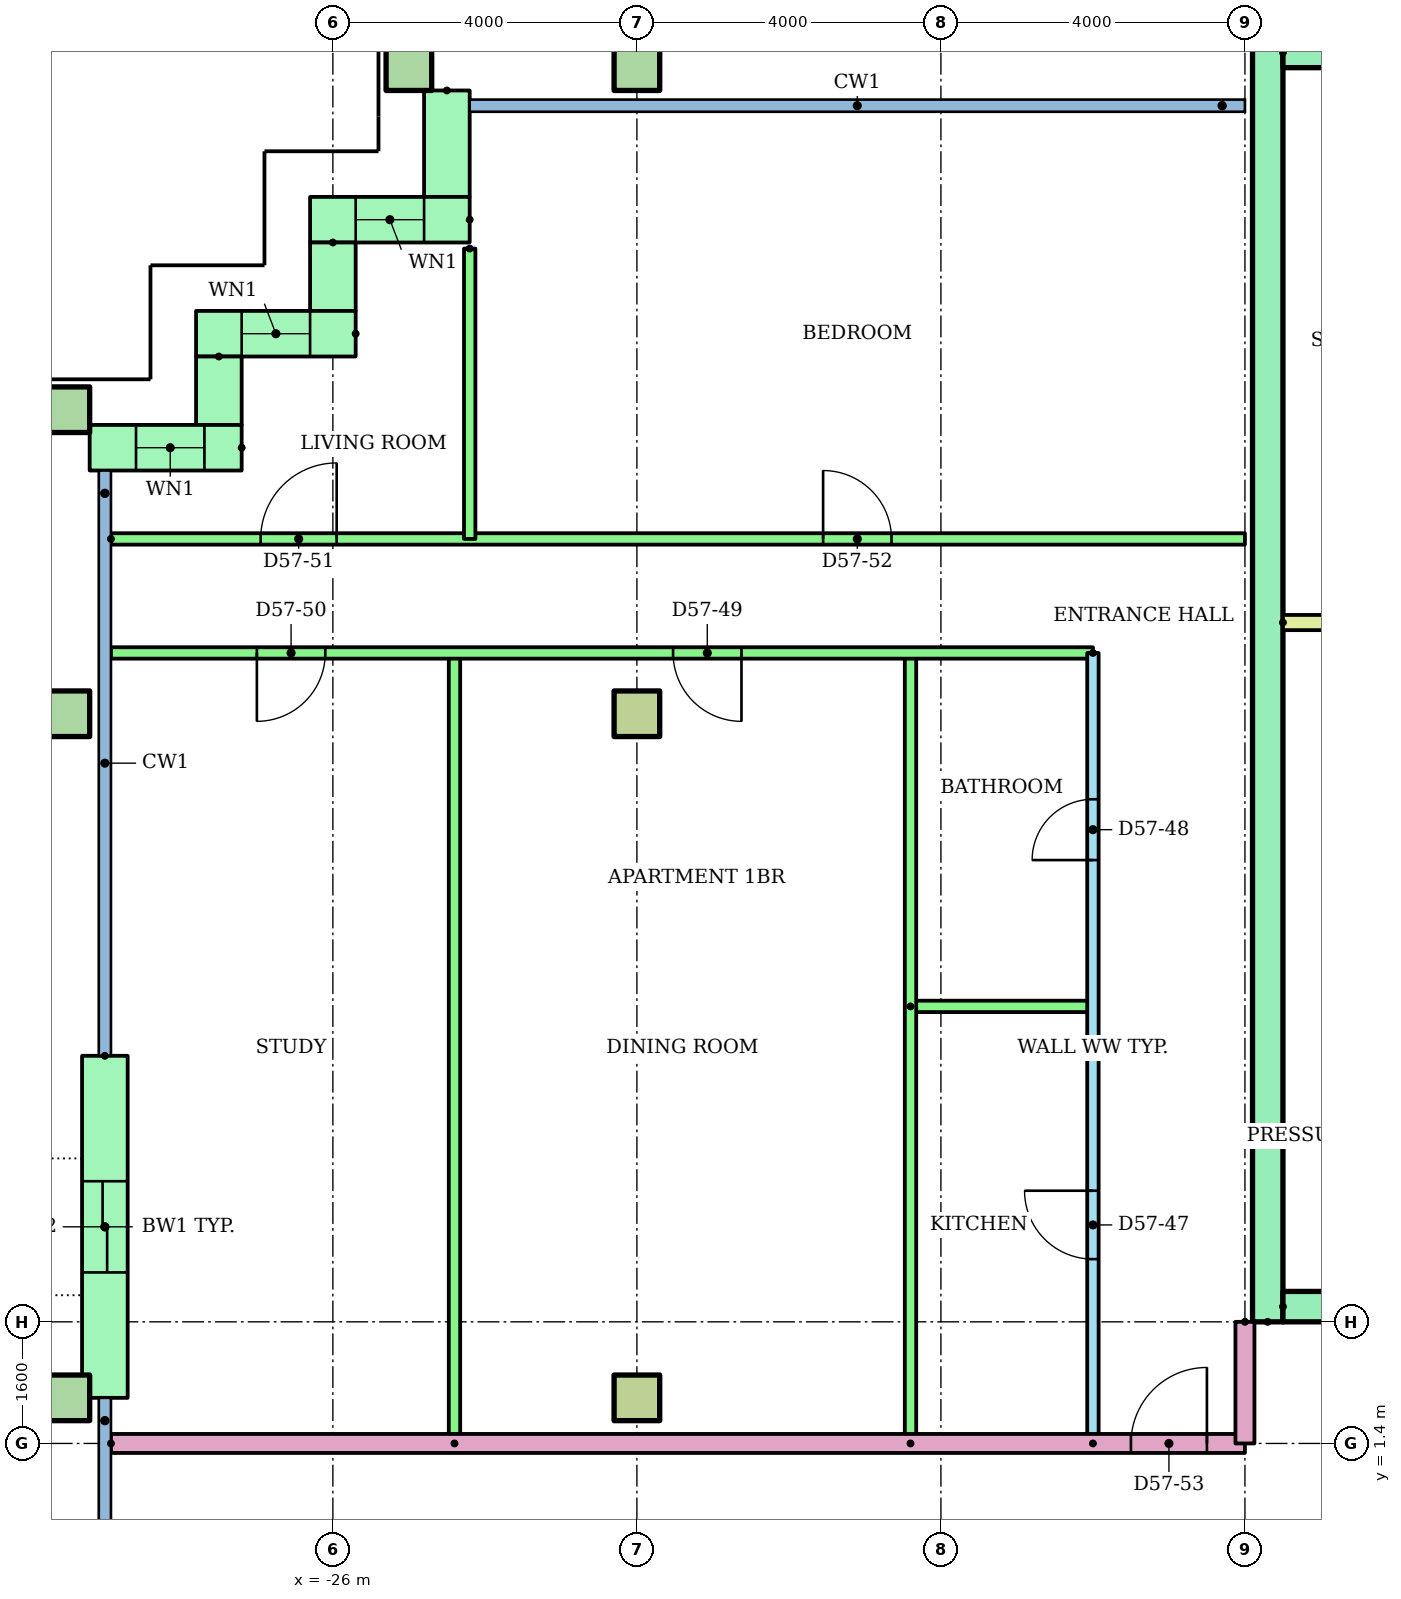
"""IFC4 building model, lengths in metres.
Left out: names, types, materials, properties, quantities, classifications, styles, units other than length and angle.
Written with IfcOpenShell. Run it as: python <this file> out.ifc"""

import sys

from ifc_helpers import new_model, si_unit, direction, frame, frame_2d, origin, origin_2d, place, context, subcontext, project, spatial, rectangle, hollow_rectangle, extrude, element, fill, save


model = new_model("IFC4")
c1 = context("Model", 3, precision=1e-05, world=origin(), true_north=direction((0.0, 1.0)))
c2 = subcontext(c1, "Body", "Model", "MODEL_VIEW")
j1 = project(units=[si_unit("LENGTHUNIT", "METRE"), si_unit("PLANEANGLEUNIT", "RADIAN")], contexts=[c1])
p1 = place(None, origin())
s1 = spatial("IfcSite", under=j1, at=p1, CompositionType="ELEMENT")
p2 = place(p1, origin())
s2 = spatial("IfcBuilding", under=s1, at=p2, CompositionType="ELEMENT")
p3 = place(p2, frame((0.0, 0.0, 220.4)))
s3 = spatial("IfcBuildingStorey", under=s2, at=p3, CompositionType="ELEMENT", Elevation=220.4)
p4 = place(p3, frame((-29.5, 2.0, 0.0)))
e1 = element("IfcColumn", 1, at=p4, inside=s3, PredefinedType="COLUMN", context=c2, shape_type="SweptSolid", body=[
    extrude(hollow_rectangle(XDim=0.6, YDim=0.6, WallThickness=0.03, at=origin_2d()), origin(), (0.0, 0.0, 1.0), 3.2),
])
p5 = place(p3, frame((-22.0, 2.0, 0.0)))
e2 = element("IfcColumn", 2, at=p5, inside=s3, PredefinedType="COLUMN", context=c2, shape_type="SweptSolid", body=[
    extrude(rectangle(XDim=0.6, YDim=0.6, at=origin_2d()), origin(), (0.0, 0.0, 1.0), 3.2),
])
p6 = place(p3, frame((-29.5, 11.0, 0.0)))
e3 = element("IfcColumn", 3, at=p6, inside=s3, PredefinedType="COLUMN", context=c2, shape_type="SweptSolid", body=[
    extrude(hollow_rectangle(XDim=0.6, YDim=0.6, WallThickness=0.03, at=origin_2d()), origin(), (0.0, 0.0, 1.0), 3.2),
])
p7 = place(p3, frame((-22.0, 11.0, 0.0)))
e4 = element("IfcColumn", 4, at=p7, inside=s3, PredefinedType="COLUMN", context=c2, shape_type="SweptSolid", body=[
    extrude(rectangle(XDim=0.6, YDim=0.6, at=origin_2d()), origin(), (0.0, 0.0, 1.0), 3.2),
])
for number, where in (
    (5, (-29.5, 15.0, 0.0)),
    (6, (-25.0, 19.5, 0.0)),
    (7, (-22.0, 19.5, 0.0)),
):
    element("IfcColumn", number, at=place(p3, frame(where)), inside=s3, PredefinedType="COLUMN", context=c2, shape_type="SweptSolid", body=[
        extrude(hollow_rectangle(XDim=0.6, YDim=0.6, WallThickness=0.03, at=origin_2d()), origin(), (0.0, 0.0, 1.0), 3.2),
    ])
p8 = place(p3, frame((-24.5, 19.2, 0.0), z_axis=(0.0, 0.0, 1.0), x_axis=(0.0, -1.0, 0.0)))
e8 = element("IfcWall", 8, at=p8, inside=s3, PredefinedType="STANDARD", context=c2, shape_type="SweptSolid", body=[
    extrude(rectangle(XDim=1.4, YDim=0.6, at=frame_2d((0.7, 0.0))), origin(), (0.0, 0.0, 1.0), 2.92),
])
p9 = place(p3, frame((-24.2, 17.5, 0.0), z_axis=(0.0, 0.0, 1.0), x_axis=(-1.0, 0.0, 0.0)))
e9 = element("IfcWall", 9, at=p9, inside=s3, PredefinedType="STANDARD", context=c2, shape_type="SweptSolid", body=[
    extrude(rectangle(XDim=2.1, YDim=0.6, at=frame_2d((1.05, 0.0))), origin(), (0.0, 0.0, 1.0), 2.92),
])
p10 = place(p9, frame((0.6, 0.0, 0.9)))
e10 = element("IfcOpeningElement", 10, at=p10, cuts=e9, PredefinedType="OPENING", context=c2, shape_type="SweptSolid", body=[
    extrude(rectangle(XDim=0.9, YDim=1.5, at=frame_2d((0.45, 0.75))), frame((0.0, 0.31, 0.0), z_axis=(0.0, -1.0, 0.0), x_axis=(1.0, 0.0, 0.0)), (0.0, 0.0, 1.0), 0.62),
])
p11 = place(p3, frame((-26.0, 17.2, 0.0), z_axis=(0.0, 0.0, 1.0), x_axis=(0.0, -1.0, 0.0)))
e11 = element("IfcWall", 11, at=p11, inside=s3, PredefinedType="STANDARD", context=c2, shape_type="SweptSolid", body=[
    extrude(rectangle(XDim=0.9, YDim=0.6, at=frame_2d((0.45, 0.0))), origin(), (0.0, 0.0, 1.0), 2.92),
])
p12 = place(p3, frame((-25.7, 16.0, 0.0), z_axis=(0.0, 0.0, 1.0), x_axis=(-1.0, 0.0, 0.0)))
e12 = element("IfcWall", 12, at=p12, inside=s3, PredefinedType="STANDARD", context=c2, shape_type="SweptSolid", body=[
    extrude(rectangle(XDim=2.1, YDim=0.6, at=frame_2d((1.05, 0.0))), origin(), (0.0, 0.0, 1.0), 2.92),
])
p13 = place(p12, frame((0.6, 0.0, 0.9)))
e13 = element("IfcOpeningElement", 13, at=p13, cuts=e12, PredefinedType="OPENING", context=c2, shape_type="SweptSolid", body=[
    extrude(rectangle(XDim=0.9, YDim=1.5, at=frame_2d((0.45, 0.75))), frame((0.0, 0.31, 0.0), z_axis=(0.0, -1.0, 0.0), x_axis=(1.0, 0.0, 0.0)), (0.0, 0.0, 1.0), 0.62),
])
p14 = place(p3, frame((-27.5, 15.7, 0.0), z_axis=(0.0, 0.0, 1.0), x_axis=(0.0, -1.0, 0.0)))
e14 = element("IfcWall", 14, at=p14, inside=s3, PredefinedType="STANDARD", context=c2, shape_type="SweptSolid", body=[
    extrude(rectangle(XDim=0.9, YDim=0.6, at=frame_2d((0.45, 0.0))), origin(), (0.0, 0.0, 1.0), 2.92),
])
p15 = place(p3, frame((-27.2, 14.5, 0.0), z_axis=(0.0, 0.0, 1.0), x_axis=(-1.0, 0.0, 0.0)))
e15 = element("IfcWall", 15, at=p15, inside=s3, PredefinedType="STANDARD", context=c2, shape_type="SweptSolid", body=[
    extrude(rectangle(XDim=2.0, YDim=0.6, at=frame_2d((1.0, 0.0))), origin(), (0.0, 0.0, 1.0), 2.92),
])
p16 = place(p15, frame((0.49, 0.0, 0.9)))
e16 = element("IfcOpeningElement", 16, at=p16, cuts=e15, PredefinedType="OPENING", context=c2, shape_type="SweptSolid", body=[
    extrude(rectangle(XDim=0.9, YDim=1.5, at=frame_2d((0.45, 0.75))), frame((0.0, 0.31, 0.0), z_axis=(0.0, -1.0, 0.0), x_axis=(1.0, 0.0, 0.0)), (0.0, 0.0, 1.0), 0.62),
])
p17 = place(p3, frame((-29.0, 6.5, 0.0), z_axis=(0.0, 0.0, 1.0), x_axis=(0.0, -1.0, 0.0)))
e17 = element("IfcWall", 17, at=p17, inside=s3, PredefinedType="STANDARD", context=c2, shape_type="SweptSolid", body=[
    extrude(rectangle(XDim=4.5, YDim=0.6, at=frame_2d((2.25, 0.0))), origin(), (0.0, 0.0, 1.0), 2.92),
])
p18 = place(p17, frame((1.65, 0.0, 0.0)))
e18 = element("IfcOpeningElement", 18, at=p18, cuts=e17, PredefinedType="OPENING", context=c2, shape_type="SweptSolid", body=[
    extrude(rectangle(XDim=1.2, YDim=2.1, at=frame_2d((0.6, 1.05))), frame((0.0, 0.31, 0.0), z_axis=(0.0, -1.0, 0.0), x_axis=(1.0, 0.0, 0.0)), (0.0, 0.0, 1.0), 0.62),
])
p19 = place(p3, frame((-13.7, 3.0, 0.0), z_axis=(0.0, 0.0, 1.0), x_axis=(0.0, 1.0, 0.0)))
e19 = element("IfcWall", 19, at=p19, inside=s3, PredefinedType="SHEAR", context=c2, shape_type="SweptSolid", body=[
    extrude(rectangle(XDim=17.0, YDim=0.4, at=frame_2d((8.5, 0.0))), origin(), (0.0, 0.0, 1.0), 2.92),
])
p20 = place(p3, frame((-13.5, 19.7, 0.0)))
e20 = element("IfcWall", 20, at=p20, inside=s3, PredefinedType="SHEAR", context=c2, shape_type="SweptSolid", body=[
    extrude(rectangle(XDim=27.0, YDim=0.4, at=frame_2d((13.5, 0.0))), origin(), (0.0, 0.0, 1.0), 2.92),
])
p21 = place(p3, frame((-13.5, 3.2, 0.0)))
e21 = element("IfcWall", 21, at=p21, inside=s3, PredefinedType="SHEAR", context=c2, shape_type="SweptSolid", body=[
    extrude(rectangle(XDim=27.0, YDim=0.4, at=frame_2d((13.5, 0.0))), origin(), (0.0, 0.0, 1.0), 2.92),
])
p22 = place(p21, frame((22.083, 0.0, 0.0)))
e22 = element("IfcOpeningElement", 22, at=p22, cuts=e21, PredefinedType="OPENING", context=c2, shape_type="SweptSolid", body=[
    extrude(rectangle(XDim=1.1, YDim=2.1, at=frame_2d((0.55, 1.05))), frame((0.0, 0.21, 0.0), z_axis=(0.0, -1.0, 0.0), x_axis=(1.0, 0.0, 0.0)), (0.0, 0.0, 1.0), 0.42),
])
p23 = place(p21, frame((25.128, 0.0, 0.0)))
e23 = element("IfcOpeningElement", 23, at=p23, cuts=e21, PredefinedType="OPENING", context=c2, shape_type="SweptSolid", body=[
    extrude(rectangle(XDim=1.1, YDim=2.1, at=frame_2d((0.55, 1.05))), frame((0.0, 0.21, 0.0), z_axis=(0.0, -1.0, 0.0), x_axis=(1.0, 0.0, 0.0)), (0.0, 0.0, 1.0), 0.42),
])
p24 = place(p21, frame((12.6, 0.0, 0.0)))
e24 = element("IfcOpeningElement", 24, at=p24, cuts=e21, PredefinedType="OPENING", context=c2, shape_type="SweptSolid", body=[
    extrude(rectangle(XDim=1.8, YDim=2.1, at=frame_2d((0.9, 1.05))), frame((0.0, 0.21, 0.0), z_axis=(0.0, -1.0, 0.0), x_axis=(1.0, 0.0, 0.0)), (0.0, 0.0, 1.0), 0.42),
])
p25 = place(p3, frame((-13.5, 12.2, 0.0)))
e25 = element("IfcWall", 25, at=p25, inside=s3, PredefinedType="PARTITIONING", context=c2, shape_type="SweptSolid", body=[
    extrude(rectangle(XDim=3.9, YDim=0.2, at=frame_2d((1.95, 0.0))), origin(), (0.0, 0.0, 1.0), 2.92),
])
p26 = place(p3, frame((-16.0, 1.4, 0.0), z_axis=(0.0, 0.0, 1.0), x_axis=(0.0, 1.0, 0.0)))
e26 = element("IfcWall", 26, at=p26, inside=s3, PredefinedType="PARTITIONING", context=c2, shape_type="SweptSolid", body=[
    extrude(rectangle(XDim=10.4, YDim=0.15, at=frame_2d((5.2, 0.0))), origin(), (0.0, 0.0, 1.0), 2.4),
])
p27 = place(p26, frame((2.425, 0.0, 0.0)))
e27 = element("IfcOpeningElement", 27, at=p27, cuts=e26, PredefinedType="OPENING", context=c2, shape_type="SweptSolid", body=[
    extrude(rectangle(XDim=0.9, YDim=2.1, at=frame_2d((0.45, 1.05))), frame((0.0, 0.085, 0.0), z_axis=(0.0, -1.0, 0.0), x_axis=(1.0, 0.0, 0.0)), (0.0, 0.0, 1.0), 0.17),
])
p28 = place(p26, frame((7.675, 0.0, 0.0)))
e28 = element("IfcOpeningElement", 28, at=p28, cuts=e26, PredefinedType="OPENING", context=c2, shape_type="SweptSolid", body=[
    extrude(rectangle(XDim=0.8, YDim=2.1, at=frame_2d((0.4, 1.05))), frame((0.0, 0.085, 0.0), z_axis=(0.0, -1.0, 0.0), x_axis=(1.0, 0.0, 0.0)), (0.0, 0.0, 1.0), 0.17),
])
p29 = place(p3, frame((-18.4, 7.15, 0.0)))
e29 = element("IfcWall", 29, at=p29, inside=s3, PredefinedType="PARTITIONING", context=c2, shape_type="SweptSolid", body=[
    extrude(rectangle(XDim=2.4, YDim=0.15, at=frame_2d((1.2, 0.0))), origin(), (0.0, 0.0, 1.0), 2.4),
])
for number, where, z_axis, x_axis in (
    (30, (-18.4, 1.4, 0.0), (0.0, 0.0, 1.0), (0.0, 1.0, 0.0)),
    (31, (-24.4, 1.4, 0.0), (0.0, 0.0, 1.0), (0.0, 1.0, 0.0)),
):
    element("IfcWall", number, at=place(p3, frame(where, z_axis=z_axis, x_axis=x_axis)), inside=s3, PredefinedType="PARTITIONING", context=c2, shape_type="SweptSolid", body=[
        extrude(rectangle(XDim=10.4, YDim=0.15, at=frame_2d((5.2, 0.0))), origin(), (0.0, 0.0, 1.0), 2.4),
    ])
p30 = place(p3, frame((-16.0, 11.8, 0.0), z_axis=(0.0, 0.0, 1.0), x_axis=(-1.0, 0.0, 0.0)))
e32 = element("IfcWall", 32, at=p30, inside=s3, PredefinedType="PARTITIONING", context=c2, shape_type="SweptSolid", body=[
    extrude(rectangle(XDim=12.92, YDim=0.15, at=frame_2d((6.46, 0.0))), origin(), (0.0, 0.0, 1.0), 2.4),
])
p31 = place(p30, frame((4.624, 0.0, 0.0)))
e33 = element("IfcOpeningElement", 33, at=p31, cuts=e32, PredefinedType="OPENING", context=c2, shape_type="SweptSolid", body=[
    extrude(rectangle(XDim=0.9, YDim=2.1, at=frame_2d((0.45, 1.05))), frame((0.0, 0.085, 0.0), z_axis=(0.0, -1.0, 0.0), x_axis=(1.0, 0.0, 0.0)), (0.0, 0.0, 1.0), 0.17),
])
p32 = place(p30, frame((10.1, 0.0, 0.0)))
e34 = element("IfcOpeningElement", 34, at=p32, cuts=e32, PredefinedType="OPENING", context=c2, shape_type="SweptSolid", body=[
    extrude(rectangle(XDim=0.9, YDim=2.1, at=frame_2d((0.45, 1.05))), frame((0.0, 0.085, 0.0), z_axis=(0.0, -1.0, 0.0), x_axis=(1.0, 0.0, 0.0)), (0.0, 0.0, 1.0), 0.17),
])
p33 = place(p3, frame((-28.92, 13.3, 0.0)))
e35 = element("IfcWall", 35, at=p33, inside=s3, PredefinedType="PARTITIONING", context=c2, shape_type="SweptSolid", body=[
    extrude(rectangle(XDim=14.92, YDim=0.15, at=frame_2d((7.46, 0.0))), origin(), (0.0, 0.0, 1.0), 2.4),
])
p34 = place(p33, frame((1.97, 0.0, 0.0)))
e36 = element("IfcOpeningElement", 36, at=p34, cuts=e35, PredefinedType="OPENING", context=c2, shape_type="SweptSolid", body=[
    extrude(rectangle(XDim=1.0, YDim=2.1, at=frame_2d((0.5, 1.05))), frame((0.0, 0.085, 0.0), z_axis=(0.0, -1.0, 0.0), x_axis=(1.0, 0.0, 0.0)), (0.0, 0.0, 1.0), 0.17),
])
p35 = place(p33, frame((9.37, 0.0, 0.0)))
e37 = element("IfcOpeningElement", 37, at=p35, cuts=e35, PredefinedType="OPENING", context=c2, shape_type="SweptSolid", body=[
    extrude(rectangle(XDim=0.9, YDim=2.1, at=frame_2d((0.45, 1.05))), frame((0.0, 0.085, 0.0), z_axis=(0.0, -1.0, 0.0), x_axis=(1.0, 0.0, 0.0)), (0.0, 0.0, 1.0), 0.17),
])
p36 = place(p3, frame((-24.2, 17.12, 0.0), z_axis=(0.0, 0.0, 1.0), x_axis=(0.0, -1.0, 0.0)))
e38 = element("IfcWall", 38, at=p36, inside=s3, PredefinedType="PARTITIONING", context=c2, shape_type="SweptSolid", body=[
    extrude(rectangle(XDim=3.82, YDim=0.15, at=frame_2d((1.91, 0.0))), origin(), (0.0, 0.0, 1.0), 2.4),
])
p37 = place(p3, frame((-28.92, 1.4, 0.0)))
e39 = element("IfcWall", 39, at=p37, inside=s3, PredefinedType="PARTITIONING", context=c2, shape_type="SweptSolid", body=[
    extrude(rectangle(XDim=14.92, YDim=0.25, at=frame_2d((7.46, 0.0))), origin(), (0.0, 0.0, 1.0), 2.4),
])
p38 = place(p37, frame((13.42, 0.0, 0.0)))
e40 = element("IfcOpeningElement", 40, at=p38, cuts=e39, PredefinedType="OPENING", context=c2, shape_type="SweptSolid", body=[
    extrude(rectangle(XDim=1.0, YDim=2.1, at=frame_2d((0.5, 1.05))), frame((0.0, 0.135, 0.0), z_axis=(0.0, -1.0, 0.0), x_axis=(1.0, 0.0, 0.0)), (0.0, 0.0, 1.0), 0.27),
])
p39 = place(p3, frame((-14.0, 3.0, 0.0), z_axis=(0.0, 0.0, 1.0), x_axis=(0.0, -1.0, 0.0)))
e41 = element("IfcWall", 41, at=p39, inside=s3, PredefinedType="PARTITIONING", context=c2, shape_type="SweptSolid", body=[
    extrude(rectangle(XDim=1.6, YDim=0.25, at=frame_2d((0.8, 0.0))), origin(), (0.0, 0.0, 1.0), 2.4),
])
p40 = place(p10, origin())
e42 = element("IfcWindow", 42, at=p40, inside=s3, PartitioningType="SINGLE_PANEL", PredefinedType="WINDOW", context=c2, shape_type="SweptSolid", body=[
    extrude(rectangle(XDim=0.9, YDim=1.5, at=frame_2d((0.45, 0.75))), frame((0.0, 0.03, 0.0), z_axis=(0.0, -1.0, 0.0), x_axis=(1.0, 0.0, 0.0)), (0.0, 0.0, 1.0), 0.06),
])
fill(e10, e42)
p41 = place(p13, origin())
e43 = element("IfcWindow", 43, at=p41, inside=s3, PartitioningType="SINGLE_PANEL", PredefinedType="WINDOW", context=c2, shape_type="SweptSolid", body=[
    extrude(rectangle(XDim=0.9, YDim=1.5, at=frame_2d((0.45, 0.75))), frame((0.0, 0.03, 0.0), z_axis=(0.0, -1.0, 0.0), x_axis=(1.0, 0.0, 0.0)), (0.0, 0.0, 1.0), 0.06),
])
fill(e13, e43)
p42 = place(p16, origin())
e44 = element("IfcWindow", 44, at=p42, inside=s3, PartitioningType="SINGLE_PANEL", PredefinedType="WINDOW", context=c2, shape_type="SweptSolid", body=[
    extrude(rectangle(XDim=0.9, YDim=1.5, at=frame_2d((0.45, 0.75))), frame((0.0, 0.03, 0.0), z_axis=(0.0, -1.0, 0.0), x_axis=(1.0, 0.0, 0.0)), (0.0, 0.0, 1.0), 0.06),
])
fill(e16, e44)
p43 = place(p27, origin())
e45 = element("IfcDoor", 45, at=p43, inside=s3, OperationType="SINGLE_SWING_RIGHT", PredefinedType="DOOR", context=c2, shape_type="SweptSolid", body=[
    extrude(rectangle(XDim=0.9, YDim=2.1, at=frame_2d((0.45, 1.05))), frame((0.0, 0.025, 0.0), z_axis=(0.0, -1.0, 0.0), x_axis=(1.0, 0.0, 0.0)), (0.0, 0.0, 1.0), 0.05),
])
fill(e27, e45)
p44 = place(p28, origin())
e46 = element("IfcDoor", 46, at=p44, inside=s3, OperationType="SINGLE_SWING_LEFT", PredefinedType="DOOR", context=c2, shape_type="SweptSolid", body=[
    extrude(rectangle(XDim=0.8, YDim=2.1, at=frame_2d((0.4, 1.05))), frame((0.0, 0.025, 0.0), z_axis=(0.0, -1.0, 0.0), x_axis=(1.0, 0.0, 0.0)), (0.0, 0.0, 1.0), 0.05),
])
fill(e28, e46)
p45 = place(p31, origin())
e47 = element("IfcDoor", 47, at=p45, inside=s3, OperationType="SINGLE_SWING_LEFT", PredefinedType="DOOR", context=c2, shape_type="SweptSolid", body=[
    extrude(rectangle(XDim=0.9, YDim=2.1, at=frame_2d((0.45, 1.05))), frame((0.0, 0.025, 0.0), z_axis=(0.0, -1.0, 0.0), x_axis=(1.0, 0.0, 0.0)), (0.0, 0.0, 1.0), 0.05),
])
fill(e33, e47)
p46 = place(p32, origin())
e48 = element("IfcDoor", 48, at=p46, inside=s3, OperationType="SINGLE_SWING_RIGHT", PredefinedType="DOOR", context=c2, shape_type="SweptSolid", body=[
    extrude(rectangle(XDim=0.9, YDim=2.1, at=frame_2d((0.45, 1.05))), frame((0.0, 0.025, 0.0), z_axis=(0.0, -1.0, 0.0), x_axis=(1.0, 0.0, 0.0)), (0.0, 0.0, 1.0), 0.05),
])
fill(e34, e48)
p47 = place(p34, origin())
e49 = element("IfcDoor", 49, at=p47, inside=s3, OperationType="SINGLE_SWING_RIGHT", PredefinedType="DOOR", context=c2, shape_type="SweptSolid", body=[
    extrude(rectangle(XDim=1.0, YDim=2.1, at=frame_2d((0.5, 1.05))), frame((0.0, 0.025, 0.0), z_axis=(0.0, -1.0, 0.0), x_axis=(1.0, 0.0, 0.0)), (0.0, 0.0, 1.0), 0.05),
])
fill(e36, e49)
p48 = place(p35, origin())
e50 = element("IfcDoor", 50, at=p48, inside=s3, OperationType="SINGLE_SWING_LEFT", PredefinedType="DOOR", context=c2, shape_type="SweptSolid", body=[
    extrude(rectangle(XDim=0.9, YDim=2.1, at=frame_2d((0.45, 1.05))), frame((0.0, 0.025, 0.0), z_axis=(0.0, -1.0, 0.0), x_axis=(1.0, 0.0, 0.0)), (0.0, 0.0, 1.0), 0.05),
])
fill(e37, e50)
p49 = place(p38, origin())
e51 = element("IfcDoor", 51, at=p49, inside=s3, OperationType="SINGLE_SWING_RIGHT", PredefinedType="DOOR", context=c2, shape_type="SweptSolid", body=[
    extrude(rectangle(XDim=1.0, YDim=2.1, at=frame_2d((0.5, 1.05))), frame((0.0, 0.025, 0.0), z_axis=(0.0, -1.0, 0.0), x_axis=(1.0, 0.0, 0.0)), (0.0, 0.0, 1.0), 0.05),
])
fill(e40, e51)
p50 = place(p18, origin())
e52 = element("IfcDoor", 52, at=p50, inside=s3, OperationType="SLIDING_TO_LEFT", PredefinedType="DOOR", context=c2, shape_type="SweptSolid", body=[
    extrude(rectangle(XDim=1.2, YDim=2.1, at=frame_2d((0.6, 1.05))), frame((0.0, 0.025, 0.0), z_axis=(0.0, -1.0, 0.0), x_axis=(1.0, 0.0, 0.0)), (0.0, 0.0, 1.0), 0.05),
])
fill(e18, e52)
save(model, sys.argv[1])
